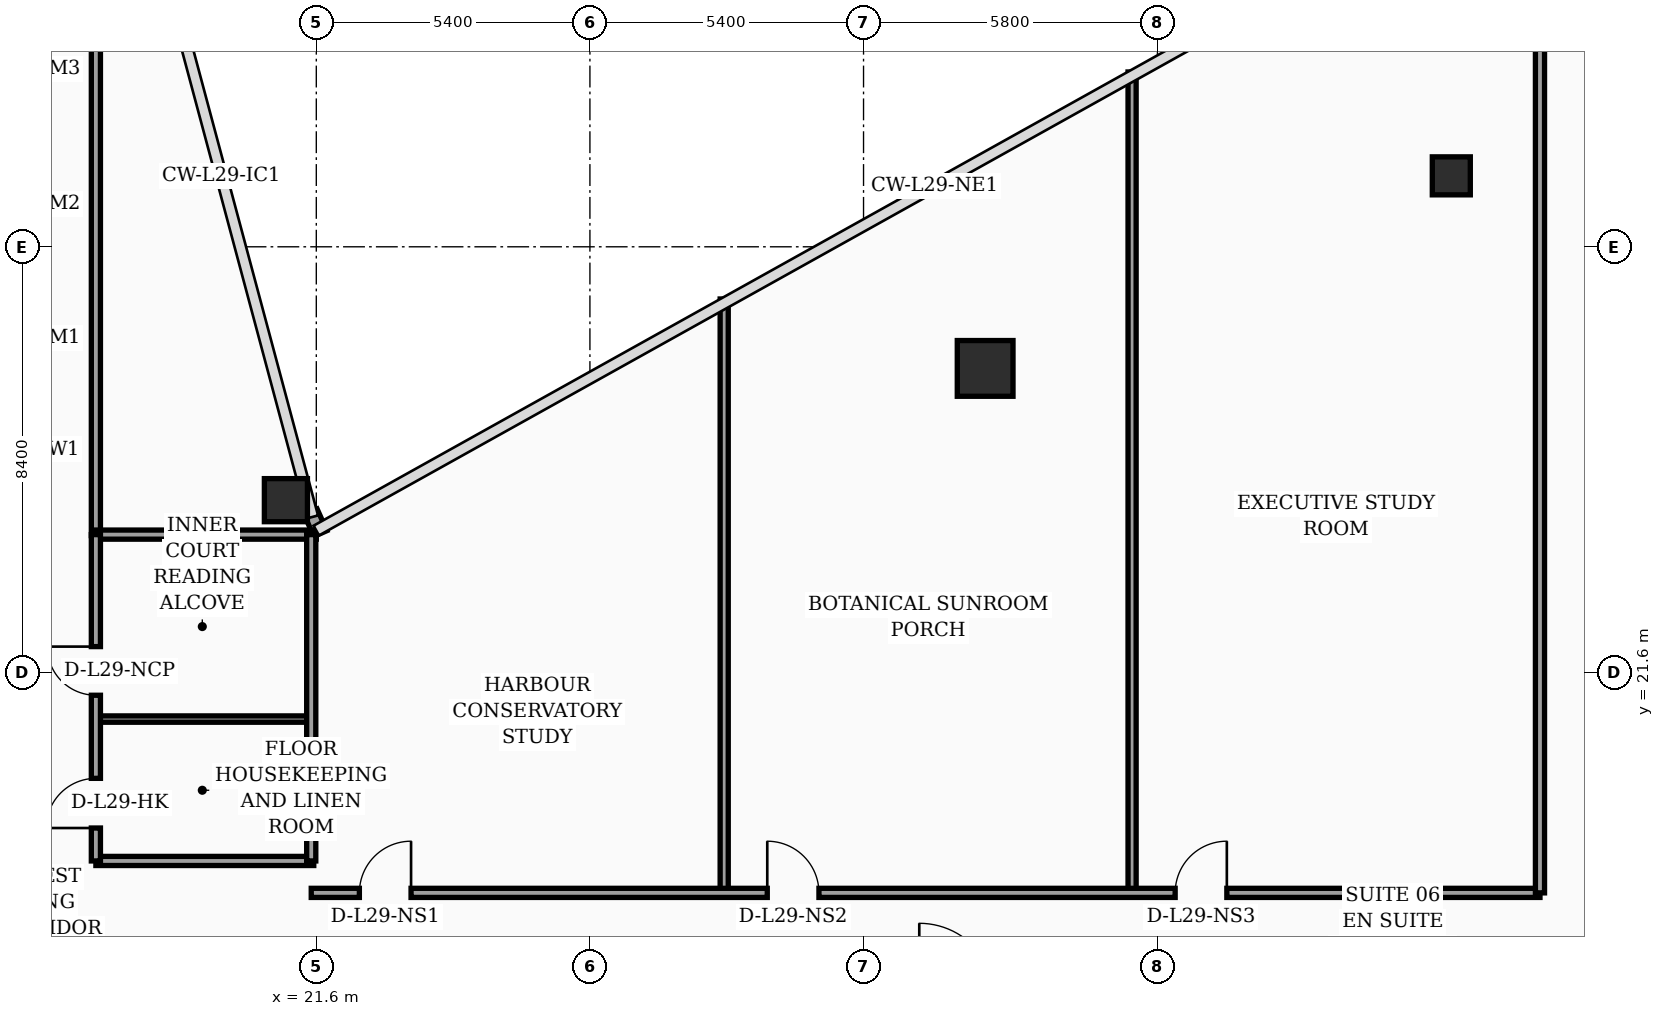
"""IFC4 building model, lengths in metres.
Left out: names, types, materials, properties, quantities, classifications, styles, units other than length and angle.
Written with IfcOpenShell. Run it as: python <this file> out.ifc"""

import sys

from ifc_helpers import new_model, si_unit, direction, frame, frame_2d, origin, origin_2d, place, context, subcontext, project, spatial, rectangle, hollow_rectangle, circle, extrude, element, fill, save


model = new_model("IFC4")
c1 = context("Model", 3, precision=1e-05, world=origin(), true_north=direction((0.0, 1.0)))
c2 = subcontext(c1, "Body", "Model", "MODEL_VIEW")
j1 = project(units=[si_unit("LENGTHUNIT", "METRE"), si_unit("PLANEANGLEUNIT", "RADIAN")], contexts=[c1])
p1 = place(None, origin())
s1 = spatial("IfcSite", under=j1, at=p1, CompositionType="ELEMENT")
p2 = place(p1, origin())
s2 = spatial("IfcBuilding", under=s1, at=p2, CompositionType="ELEMENT")
p3 = place(p2, frame((0.0, 0.0, 120.2)))
s3 = spatial("IfcBuildingStorey", under=s2, at=p3, CompositionType="ELEMENT", Elevation=120.2)
p4 = place(p3, frame((21.0, 25.0, 0.0), z_axis=(0.0, 0.0, 1.0), x_axis=(1.0, 0.0, 0.0)))
e1 = element("IfcColumn", 1, at=p4, inside=s3, PredefinedType="COLUMN", context=c2, shape_type="SweptSolid", body=[
    extrude(hollow_rectangle(XDim=0.85, YDim=0.85, WallThickness=0.036, at=origin_2d()), origin(), (0.0, 0.0, 1.0), 3.56),
])
p5 = place(p3, frame((34.8, 27.6, 0.0), z_axis=(0.0, 0.0, 1.0), x_axis=(1.0, 0.0, 0.0)))
e2 = element("IfcColumn", 2, at=p5, inside=s3, PredefinedType="COLUMN", context=c2, shape_type="SweptSolid", body=[
    extrude(circle(Radius=0.55, at=origin_2d()), origin(), (0.0, 0.0, 1.0), 3.56),
])
p6 = place(p3, frame((44.0, 31.4, 0.0), z_axis=(0.0, 0.0, 1.0), x_axis=(1.0, 0.0, 0.0)))
e3 = element("IfcColumn", 3, at=p6, inside=s3, PredefinedType="COLUMN", context=c2, shape_type="SweptSolid", body=[
    extrude(hollow_rectangle(XDim=0.75, YDim=0.75, WallThickness=0.032, at=origin_2d()), origin(), (0.0, 0.0, 1.0), 3.56),
])
p7 = place(p3, frame((21.68, 24.34, 0.0), z_axis=(0.0, 0.0, 1.0), x_axis=(-0.40758134973, 0.913168901875, 0.0)))
e4 = element("IfcWall", 4, at=p7, inside=s3, PredefinedType="SOLIDWALL", context=c2, shape_type="SweptSolid", body=[
    extrude(rectangle(XDim=0.471, YDim=0.28, at=frame_2d((0.235, 0.0))), origin(), (0.0, 0.0, 1.0), 3.56),
])
p8 = place(p3, frame((17.25, 24.3, 0.0), z_axis=(0.0, 0.0, 1.0), x_axis=(0.0, 1.0, 0.0)))
e5 = element("IfcWall", 5, at=p8, inside=s3, PredefinedType="PARTITIONING", context=c2, shape_type="SweptSolid", body=[
    extrude(rectangle(XDim=17.65, YDim=0.18, at=frame_2d((8.825, 0.0))), origin(), (0.0, 0.0, 1.0), 2.84),
])
p9 = place(p3, frame((17.25, 17.88, 0.0), z_axis=(0.0, 0.0, 1.0), x_axis=(1.0, 0.0, 0.0)))
e6 = element("IfcWall", 6, at=p9, inside=s3, PredefinedType="PARTITIONING", context=c2, shape_type="SweptSolid", body=[
    extrude(rectangle(XDim=4.3, YDim=0.18, at=frame_2d((2.15, 0.0))), origin(), (0.0, 0.0, 1.0), 3.56),
])
p10 = place(p3, frame((17.25, 20.68, 0.0), z_axis=(0.0, 0.0, 1.0), x_axis=(1.0, 0.0, 0.0)))
e7 = element("IfcWall", 7, at=p10, inside=s3, PredefinedType="PARTITIONING", context=c2, shape_type="SweptSolid", body=[
    extrude(rectangle(XDim=4.3, YDim=0.125, at=frame_2d((2.15, 0.0))), origin(), (0.0, 0.0, 1.0), 3.56),
])
p11 = place(p3, frame((17.25, 24.32, 0.0), z_axis=(0.0, 0.0, 1.0), x_axis=(1.0, 0.0, 0.0)))
e8 = element("IfcWall", 8, at=p11, inside=s3, PredefinedType="PARTITIONING", context=c2, shape_type="SweptSolid", body=[
    extrude(rectangle(XDim=4.35, YDim=0.18, at=frame_2d((2.175, 0.0))), origin(), (0.0, 0.0, 1.0), 3.56),
])
p12 = place(p3, frame((21.5, 17.88, 0.0), z_axis=(0.0, 0.0, 1.0), x_axis=(0.0, 1.0, 0.0)))
e9 = element("IfcWall", 9, at=p12, inside=s3, PredefinedType="PARTITIONING", context=c2, shape_type="SweptSolid", body=[
    extrude(rectangle(XDim=6.44, YDim=0.18, at=frame_2d((3.22, 0.0))), origin(), (0.0, 0.0, 1.0), 3.56),
])
p13 = place(p3, frame((17.25, 17.88, 0.0), z_axis=(0.0, 0.0, 1.0), x_axis=(0.0, 1.0, 0.0)))
e10 = element("IfcWall", 10, at=p13, inside=s3, PredefinedType="PARTITIONING", context=c2, shape_type="SweptSolid", body=[
    extrude(rectangle(XDim=6.44, YDim=0.18, at=frame_2d((3.22, 0.0))), origin(), (0.0, 0.0, 1.0), 3.56),
])
p14 = place(p13, frame((0.65, 0.0, 0.0)))
e11 = element("IfcOpeningElement", 11, at=p14, cuts=e10, PredefinedType="OPENING", context=c2, shape_type="SweptSolid", body=[
    extrude(rectangle(XDim=0.98, YDim=2.15, at=frame_2d((0.49, 1.075))), frame((0.0, 0.1, 0.0), z_axis=(0.0, -1.0, 0.0), x_axis=(1.0, 0.0, 0.0)), (0.0, 0.0, 1.0), 0.2),
])
p15 = place(p13, frame((3.27, 0.0, 0.0)))
e12 = element("IfcOpeningElement", 12, at=p15, cuts=e10, PredefinedType="OPENING", context=c2, shape_type="SweptSolid", body=[
    extrude(rectangle(XDim=0.96, YDim=2.2, at=frame_2d((0.48, 1.1))), frame((0.0, 0.1, 0.0), z_axis=(0.0, -1.0, 0.0), x_axis=(1.0, 0.0, 0.0)), (0.0, 0.0, 1.0), 0.2),
])
p16 = place(p3, frame((29.65, 17.25, 0.0), z_axis=(0.0, 0.0, 1.0), x_axis=(0.0, 1.0, 0.0)))
e13 = element("IfcWall", 13, at=p16, inside=s3, PredefinedType="PARTITIONING", context=c2, shape_type="SweptSolid", body=[
    extrude(rectangle(XDim=11.72, YDim=0.16, at=frame_2d((5.86, 0.0))), origin(), (0.0, 0.0, 1.0), 2.84),
])
p17 = place(p3, frame((37.7, 17.25, 0.0), z_axis=(0.0, 0.0, 1.0), x_axis=(0.0, 1.0, 0.0)))
e14 = element("IfcWall", 14, at=p17, inside=s3, PredefinedType="PARTITIONING", context=c2, shape_type="SweptSolid", body=[
    extrude(rectangle(XDim=16.2, YDim=0.16, at=frame_2d((8.1, 0.0))), origin(), (0.0, 0.0, 1.0), 2.84),
])
p18 = place(p3, frame((21.5, 17.25, 0.0), z_axis=(0.0, 0.0, 1.0), x_axis=(1.0, 0.0, 0.0)))
e15 = element("IfcWall", 15, at=p18, inside=s3, PredefinedType="PARTITIONING", context=c2, shape_type="SweptSolid", body=[
    extrude(rectangle(XDim=24.25, YDim=0.18, at=frame_2d((12.125, 0.0))), origin(), (0.0, 0.0, 1.0), 2.84),
])
p19 = place(p18, frame((0.95, 0.0, 0.0)))
e16 = element("IfcOpeningElement", 16, at=p19, cuts=e15, PredefinedType="OPENING", context=c2, shape_type="SweptSolid", body=[
    extrude(rectangle(XDim=1.02, YDim=2.2, at=frame_2d((0.51, 1.1))), frame((0.0, 0.1, 0.0), z_axis=(0.0, -1.0, 0.0), x_axis=(1.0, 0.0, 0.0)), (0.0, 0.0, 1.0), 0.2),
])
p20 = place(p18, frame((9.0, 0.0, 0.0)))
e17 = element("IfcOpeningElement", 17, at=p20, cuts=e15, PredefinedType="OPENING", context=c2, shape_type="SweptSolid", body=[
    extrude(rectangle(XDim=1.02, YDim=2.2, at=frame_2d((0.51, 1.1))), frame((0.0, 0.1, 0.0), z_axis=(0.0, -1.0, 0.0), x_axis=(1.0, 0.0, 0.0)), (0.0, 0.0, 1.0), 0.2),
])
p21 = place(p18, frame((17.05, 0.0, 0.0)))
e18 = element("IfcOpeningElement", 18, at=p21, cuts=e15, PredefinedType="OPENING", context=c2, shape_type="SweptSolid", body=[
    extrude(rectangle(XDim=1.02, YDim=2.2, at=frame_2d((0.51, 1.1))), frame((0.0, 0.1, 0.0), z_axis=(0.0, -1.0, 0.0), x_axis=(1.0, 0.0, 0.0)), (0.0, 0.0, 1.0), 0.2),
])
p22 = place(p3, frame((45.75, 17.25, 0.0), z_axis=(0.0, 0.0, 1.0), x_axis=(0.0, 1.0, 0.0)))
e19 = element("IfcWall", 19, at=p22, inside=s3, PredefinedType="PARTITIONING", context=c2, shape_type="SweptSolid", body=[
    extrude(rectangle(XDim=20.69, YDim=0.18, at=frame_2d((10.345, 0.0))), origin(), (0.0, 0.0, 1.0), 2.84),
])
p23 = place(p14, origin())
e20 = element("IfcDoor", 20, at=p23, inside=s3, OperationType="SINGLE_SWING_LEFT", PredefinedType="DOOR", context=c2, shape_type="SweptSolid", body=[
    extrude(rectangle(XDim=0.98, YDim=2.15, at=frame_2d((0.49, 1.075))), frame((0.0, 0.025, 0.0), z_axis=(0.0, -1.0, 0.0), x_axis=(1.0, 0.0, 0.0)), (0.0, 0.0, 1.0), 0.05),
])
fill(e11, e20)
p24 = place(p15, origin())
e21 = element("IfcDoor", 21, at=p24, inside=s3, OperationType="SINGLE_SWING_RIGHT", PredefinedType="DOOR", context=c2, shape_type="SweptSolid", body=[
    extrude(rectangle(XDim=0.96, YDim=2.2, at=frame_2d((0.48, 1.1))), frame((0.0, 0.025, 0.0), z_axis=(0.0, -1.0, 0.0), x_axis=(1.0, 0.0, 0.0)), (0.0, 0.0, 1.0), 0.05),
])
fill(e12, e21)
p25 = place(p19, origin())
e22 = element("IfcDoor", 22, at=p25, inside=s3, OperationType="SINGLE_SWING_RIGHT", PredefinedType="DOOR", context=c2, shape_type="SweptSolid", body=[
    extrude(rectangle(XDim=1.02, YDim=2.2, at=frame_2d((0.51, 1.1))), frame((0.0, 0.025, 0.0), z_axis=(0.0, -1.0, 0.0), x_axis=(1.0, 0.0, 0.0)), (0.0, 0.0, 1.0), 0.05),
])
fill(e16, e22)
p26 = place(p20, origin())
e23 = element("IfcDoor", 23, at=p26, inside=s3, OperationType="SINGLE_SWING_LEFT", PredefinedType="DOOR", context=c2, shape_type="SweptSolid", body=[
    extrude(rectangle(XDim=1.02, YDim=2.2, at=frame_2d((0.51, 1.1))), frame((0.0, 0.025, 0.0), z_axis=(0.0, -1.0, 0.0), x_axis=(1.0, 0.0, 0.0)), (0.0, 0.0, 1.0), 0.05),
])
fill(e17, e23)
p27 = place(p21, origin())
e24 = element("IfcDoor", 24, at=p27, inside=s3, OperationType="SINGLE_SWING_RIGHT", PredefinedType="DOOR", context=c2, shape_type="SweptSolid", body=[
    extrude(rectangle(XDim=1.02, YDim=2.2, at=frame_2d((0.51, 1.1))), frame((0.0, 0.025, 0.0), z_axis=(0.0, -1.0, 0.0), x_axis=(1.0, 0.0, 0.0)), (0.0, 0.0, 1.0), 0.05),
])
fill(e18, e24)
save(model, sys.argv[1])
